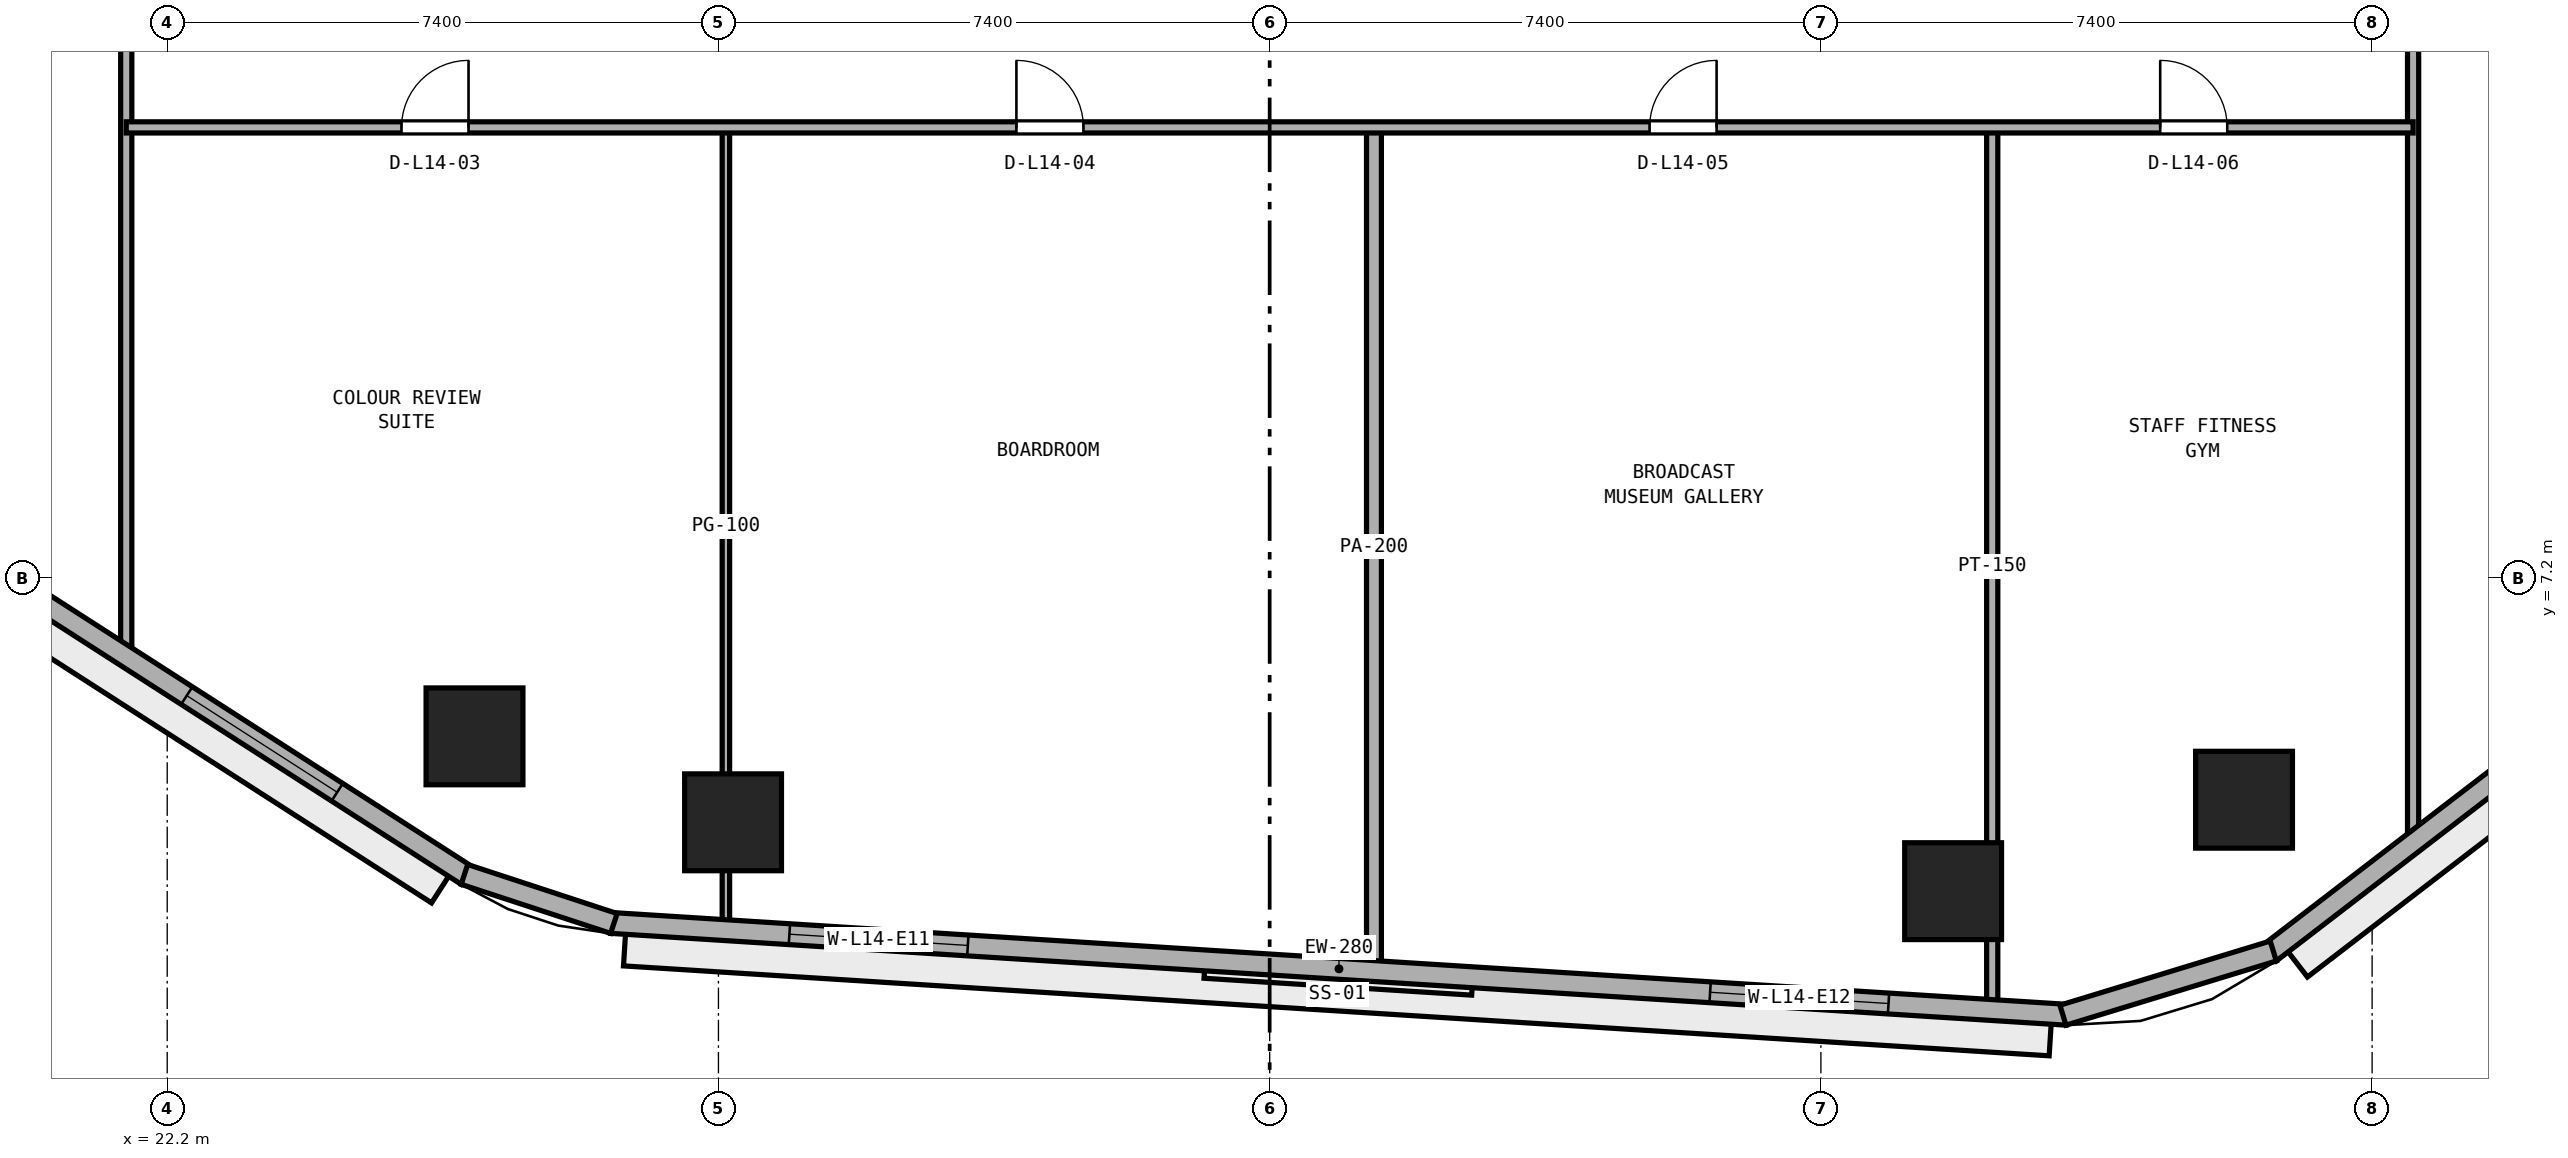
"""IFC4 building model, lengths in metres.
Left out: names, types, materials, properties, quantities, classifications, styles, units other than length and angle.
Written with IfcOpenShell. Run it as: python <this file> out.ifc"""

import sys

from ifc_helpers import new_model, si_unit, direction, frame, frame_2d, origin, origin_2d, place, context, subcontext, project, spatial, rectangle, extrude, element, fill, save


model = new_model("IFC4")
c1 = context("Model", 3, precision=1e-05, world=origin(), true_north=direction((0.0, 1.0)))
c2 = subcontext(c1, "Body", "Model", "MODEL_VIEW")
j1 = project(units=[si_unit("LENGTHUNIT", "METRE"), si_unit("PLANEANGLEUNIT", "RADIAN")], contexts=[c1])
p1 = place(None, origin())
s1 = spatial("IfcSite", under=j1, at=p1, CompositionType="ELEMENT")
p2 = place(p1, origin())
s2 = spatial("IfcBuilding", under=s1, at=p2, CompositionType="ELEMENT")
p3 = place(p2, frame((0.0, 0.0, 59.2)))
s3 = spatial("IfcBuildingStorey", under=s2, at=p3, CompositionType="ELEMENT", Elevation=59.2)
for number, where, z_axis, x_axis in (
    (1, (29.796, 3.922, 0.0), (0.0, 0.0, 1.0), (1.0, 0.0, 0.0)),
    (2, (46.175, 2.998, 0.0), (0.0, 0.0, 1.0), (1.0, 0.0, 0.0)),
    (3, (50.081, 4.225, 0.0), (0.0, 0.0, 1.0), (1.0, 0.0, 0.0)),
    (4, (26.325, 5.076, 0.0), (0.0, 0.0, 1.0), (1.0, 0.0, 0.0)),
):
    element("IfcColumn", number, at=place(p3, frame(where, z_axis=z_axis, x_axis=x_axis)), inside=s3, PredefinedType="COLUMN", context=c2, shape_type="SweptSolid", body=[
        extrude(rectangle(XDim=1.3, YDim=1.3, at=origin_2d()), origin(), (0.0, 0.0, 1.0), 3.8),
    ])
p4 = place(p3, frame((52.35, 3.611, 0.0), z_axis=(0.0, 0.0, 1.0), x_axis=(0.0, 1.0, 0.0)))
e5 = element("IfcWall", 5, at=p4, inside=s3, PredefinedType="PARTITIONING", context=c2, shape_type="SweptSolid", body=[
    extrude(rectangle(XDim=43.441, YDim=0.15, at=frame_2d((21.72, 0.0))), origin(), (0.0, 0.0, 1.0), 3.525),
])
p5 = place(p4, frame((12.364, 0.0, 0.0)))
e6 = element("IfcOpeningElement", 6, at=p5, cuts=e5, PredefinedType="OPENING", context=c2, shape_type="SweptSolid", body=[
    extrude(rectangle(XDim=0.9, YDim=2.1, at=frame_2d((0.45, 1.05))), frame((0.0, 0.085, 0.0), z_axis=(0.0, -1.0, 0.0), x_axis=(1.0, 0.0, 0.0)), (0.0, 0.0, 1.0), 0.17),
])
p6 = place(p4, frame((18.889, 0.0, 0.0)))
e7 = element("IfcOpeningElement", 7, at=p6, cuts=e5, PredefinedType="OPENING", context=c2, shape_type="SweptSolid", body=[
    extrude(rectangle(XDim=1.0, YDim=2.12, at=frame_2d((0.5, 1.06))), frame((0.0, 0.085, 0.0), z_axis=(0.0, -1.0, 0.0), x_axis=(1.0, 0.0, 0.0)), (0.0, 0.0, 1.0), 0.17),
])
p7 = place(p4, frame((25.689, 0.0, 0.0)))
e8 = element("IfcOpeningElement", 8, at=p7, cuts=e5, PredefinedType="OPENING", context=c2, shape_type="SweptSolid", body=[
    extrude(rectangle(XDim=1.0, YDim=2.12, at=frame_2d((0.5, 1.06))), frame((0.0, 0.085, 0.0), z_axis=(0.0, -1.0, 0.0), x_axis=(1.0, 0.0, 0.0)), (0.0, 0.0, 1.0), 0.17),
])
p8 = place(p4, frame((31.114, 0.0, 0.0)))
e9 = element("IfcOpeningElement", 9, at=p8, cuts=e5, PredefinedType="OPENING", context=c2, shape_type="SweptSolid", body=[
    extrude(rectangle(XDim=0.9, YDim=2.1, at=frame_2d((0.45, 1.05))), frame((0.0, 0.085, 0.0), z_axis=(0.0, -1.0, 0.0), x_axis=(1.0, 0.0, 0.0)), (0.0, 0.0, 1.0), 0.17),
])
p9 = place(p3, frame((46.7, 1.467, 0.0), z_axis=(0.0, 0.0, 1.0), x_axis=(0.0, 1.0, 0.0)))
e10 = element("IfcWall", 10, at=p9, inside=s3, PredefinedType="PARTITIONING", context=c2, shape_type="SweptSolid", body=[
    extrude(rectangle(XDim=11.783, YDim=0.15, at=frame_2d((5.892, 0.0))), origin(), (0.0, 0.0, 1.0), 3.525),
])
p10 = place(p3, frame((38.4, 1.99, 0.0), z_axis=(0.0, 0.0, 1.0), x_axis=(0.0, 1.0, 0.0)))
e11 = element("IfcWall", 11, at=p10, inside=s3, PredefinedType="PARTITIONING", context=c2, shape_type="SweptSolid", body=[
    extrude(rectangle(XDim=11.26, YDim=0.2, at=frame_2d((5.63, 0.0))), origin(), (0.0, 0.0, 1.0), 3.525),
])
p11 = place(p3, frame((29.7, 2.539, 0.0), z_axis=(0.0, 0.0, 1.0), x_axis=(0.0, 1.0, 0.0)))
e12 = element("IfcWall", 12, at=p11, inside=s3, PredefinedType="PARTITIONING", context=c2, shape_type="SweptSolid", body=[
    extrude(rectangle(XDim=10.711, YDim=0.1, at=frame_2d((5.355, 0.0))), origin(), (0.0, 0.0, 1.0), 2.908),
])
p12 = place(p3, frame((21.65, 6.119, 0.0), z_axis=(0.0, 0.0, 1.0), x_axis=(0.0, 1.0, 0.0)))
e13 = element("IfcWall", 13, at=p12, inside=s3, PredefinedType="PARTITIONING", context=c2, shape_type="SweptSolid", body=[
    extrude(rectangle(XDim=37.884, YDim=0.15, at=frame_2d((18.942, 0.0))), origin(), (0.0, 0.0, 1.0), 3.525),
])
p13 = place(p12, frame((13.556, 0.0, 0.0)))
e14 = element("IfcOpeningElement", 14, at=p13, cuts=e13, PredefinedType="OPENING", context=c2, shape_type="SweptSolid", body=[
    extrude(rectangle(XDim=0.9, YDim=2.1, at=frame_2d((0.45, 1.05))), frame((0.0, 0.085, 0.0), z_axis=(0.0, -1.0, 0.0), x_axis=(1.0, 0.0, 0.0)), (0.0, 0.0, 1.0), 0.17),
])
p14 = place(p12, frame((25.506, 0.0, 0.0)))
e15 = element("IfcOpeningElement", 15, at=p14, cuts=e13, PredefinedType="OPENING", context=c2, shape_type="SweptSolid", body=[
    extrude(rectangle(XDim=0.9, YDim=2.1, at=frame_2d((0.45, 1.05))), frame((0.0, 0.085, 0.0), z_axis=(0.0, -1.0, 0.0), x_axis=(1.0, 0.0, 0.0)), (0.0, 0.0, 1.0), 0.17),
])
p15 = place(p3, frame((21.65, 13.25, 0.0), z_axis=(0.0, 0.0, 1.0), x_axis=(1.0, 0.0, 0.0)))
e16 = element("IfcWall", 16, at=p15, inside=s3, PredefinedType="PARTITIONING", context=c2, shape_type="SweptSolid", body=[
    extrude(rectangle(XDim=30.7, YDim=0.15, at=frame_2d((15.35, 0.0))), origin(), (0.0, 0.0, 1.0), 3.525),
])
p16 = place(p15, frame((3.695, 0.0, 0.0)))
e17 = element("IfcOpeningElement", 17, at=p16, cuts=e16, PredefinedType="OPENING", context=c2, shape_type="SweptSolid", body=[
    extrude(rectangle(XDim=0.9, YDim=2.1, at=frame_2d((0.45, 1.05))), frame((0.0, 0.085, 0.0), z_axis=(0.0, -1.0, 0.0), x_axis=(1.0, 0.0, 0.0)), (0.0, 0.0, 1.0), 0.17),
])
p17 = place(p15, frame((11.95, 0.0, 0.0)))
e18 = element("IfcOpeningElement", 18, at=p17, cuts=e16, PredefinedType="OPENING", context=c2, shape_type="SweptSolid", body=[
    extrude(rectangle(XDim=0.9, YDim=2.1, at=frame_2d((0.45, 1.05))), frame((0.0, 0.085, 0.0), z_axis=(0.0, -1.0, 0.0), x_axis=(1.0, 0.0, 0.0)), (0.0, 0.0, 1.0), 0.17),
])
p18 = place(p15, frame((20.45, 0.0, 0.0)))
e19 = element("IfcOpeningElement", 19, at=p18, cuts=e16, PredefinedType="OPENING", context=c2, shape_type="SweptSolid", body=[
    extrude(rectangle(XDim=0.9, YDim=2.1, at=frame_2d((0.45, 1.05))), frame((0.0, 0.085, 0.0), z_axis=(0.0, -1.0, 0.0), x_axis=(1.0, 0.0, 0.0)), (0.0, 0.0, 1.0), 0.17),
])
p19 = place(p15, frame((27.305, 0.0, 0.0)))
e20 = element("IfcOpeningElement", 20, at=p19, cuts=e16, PredefinedType="OPENING", context=c2, shape_type="SweptSolid", body=[
    extrude(rectangle(XDim=0.9, YDim=2.1, at=frame_2d((0.45, 1.05))), frame((0.0, 0.085, 0.0), z_axis=(0.0, -1.0, 0.0), x_axis=(1.0, 0.0, 0.0)), (0.0, 0.0, 1.0), 0.17),
])
p20 = place(p3, frame((28.161, 2.571, 0.0), z_axis=(0.0, 0.0, 1.0), x_axis=(0.998017288298, -0.06294038654, 0.0)))
e21 = element("IfcWall", 21, at=p20, inside=s3, PredefinedType="STANDARD", context=c2, shape_type="SweptSolid", body=[
    extrude(rectangle(XDim=19.577, YDim=0.28, at=frame_2d((9.789, 0.0))), origin(), (0.0, 0.0, 1.0), 3.525),
])
p21 = place(p20, frame((2.396, 0.0, 0.9)))
e22 = element("IfcOpeningElement", 22, at=p21, cuts=e21, PredefinedType="OPENING", context=c2, shape_type="SweptSolid", body=[
    extrude(rectangle(XDim=2.4, YDim=1.75, at=frame_2d((1.2, 0.875))), frame((0.0, 0.15, 0.0), z_axis=(0.0, -1.0, 0.0), x_axis=(1.0, 0.0, 0.0)), (0.0, 0.0, 1.0), 0.3),
])
p22 = place(p20, frame((14.781, 0.0, 0.9)))
e23 = element("IfcOpeningElement", 23, at=p22, cuts=e21, PredefinedType="OPENING", context=c2, shape_type="SweptSolid", body=[
    extrude(rectangle(XDim=2.4, YDim=1.75, at=frame_2d((1.2, 0.875))), frame((0.0, 0.15, 0.0), z_axis=(0.0, -1.0, 0.0), x_axis=(1.0, 0.0, 0.0)), (0.0, 0.0, 1.0), 0.3),
])
p23 = place(p3, frame((50.429, 2.172, 0.0), z_axis=(0.0, 0.0, 1.0), x_axis=(0.792937466367, 0.609303023488, 0.0)))
e24 = element("IfcWall", 24, at=p23, inside=s3, PredefinedType="STANDARD", context=c2, shape_type="SweptSolid", body=[
    extrude(rectangle(XDim=17.713, YDim=0.28, at=frame_2d((8.856, 0.0))), origin(), (0.0, 0.0, 1.0), 3.525),
])
p24 = place(p23, frame((7.656, 0.0, 0.9)))
e25 = element("IfcOpeningElement", 25, at=p24, cuts=e24, PredefinedType="OPENING", context=c2, shape_type="SweptSolid", body=[
    extrude(rectangle(XDim=2.4, YDim=1.75, at=frame_2d((1.2, 0.875))), frame((0.0, 0.15, 0.0), z_axis=(0.0, -1.0, 0.0), x_axis=(1.0, 0.0, 0.0)), (0.0, 0.0, 1.0), 0.3),
])
p25 = place(p23, frame((13.227, 0.0, 0.9)))
e26 = element("IfcOpeningElement", 26, at=p25, cuts=e24, PredefinedType="OPENING", context=c2, shape_type="SweptSolid", body=[
    extrude(rectangle(XDim=2.4, YDim=1.75, at=frame_2d((1.2, 0.875))), frame((0.0, 0.15, 0.0), z_axis=(0.0, -1.0, 0.0), x_axis=(1.0, 0.0, 0.0)), (0.0, 0.0, 1.0), 0.3),
])
p26 = place(p3, frame((11.405, 12.728, 0.0), z_axis=(0.0, 0.0, 1.0), x_axis=(0.841304564637, -0.540561402175, 0.0)))
e27 = element("IfcWall", 27, at=p26, inside=s3, PredefinedType="STANDARD", context=c2, shape_type="SweptSolid", body=[
    extrude(rectangle(XDim=17.612, YDim=0.28, at=frame_2d((8.806, 0.0))), origin(), (0.0, 0.0, 1.0), 3.525),
])
p27 = place(p26, frame((2.069, 0.0, 0.9)))
e28 = element("IfcOpeningElement", 28, at=p27, cuts=e27, PredefinedType="OPENING", context=c2, shape_type="SweptSolid", body=[
    extrude(rectangle(XDim=2.4, YDim=1.75, at=frame_2d((1.2, 0.875))), frame((0.0, 0.15, 0.0), z_axis=(0.0, -1.0, 0.0), x_axis=(1.0, 0.0, 0.0)), (0.0, 0.0, 1.0), 0.3),
])
p28 = place(p26, frame((7.606, 0.0, 0.9)))
e29 = element("IfcOpeningElement", 29, at=p28, cuts=e27, PredefinedType="OPENING", context=c2, shape_type="SweptSolid", body=[
    extrude(rectangle(XDim=2.4, YDim=1.75, at=frame_2d((1.2, 0.875))), frame((0.0, 0.15, 0.0), z_axis=(0.0, -1.0, 0.0), x_axis=(1.0, 0.0, 0.0)), (0.0, 0.0, 1.0), 0.3),
])
p29 = place(p26, frame((13.143, 0.0, 0.9)))
e30 = element("IfcOpeningElement", 30, at=p29, cuts=e27, PredefinedType="OPENING", context=c2, shape_type="SweptSolid", body=[
    extrude(rectangle(XDim=2.4, YDim=1.75, at=frame_2d((1.2, 0.875))), frame((0.0, 0.15, 0.0), z_axis=(0.0, -1.0, 0.0), x_axis=(1.0, 0.0, 0.0)), (0.0, 0.0, 1.0), 0.3),
])
p30 = place(p3, frame((47.65, 1.333, 0.0), z_axis=(0.0, 0.0, 1.0), x_axis=(0.956461287977, 0.291859220516, 0.0)))
e31 = element("IfcWall", 31, at=p30, inside=s3, PredefinedType="STANDARD", context=c2, shape_type="SweptSolid", body=[
    extrude(rectangle(XDim=2.952, YDim=0.28, at=frame_2d((1.476, 0.0))), origin(), (0.0, 0.0, 1.0), 3.525),
])
p31 = place(p3, frame((26.19, 3.223, 0.0), z_axis=(0.0, 0.0, 1.0), x_axis=(0.95016442175, -0.311749212734, 0.0)))
e32 = element("IfcWall", 32, at=p31, inside=s3, PredefinedType="STANDARD", context=c2, shape_type="SweptSolid", body=[
    extrude(rectangle(XDim=2.111, YDim=0.28, at=frame_2d((1.056, 0.0))), origin(), (0.0, 0.0, 1.0), 3.525),
])
p32 = place(p16, origin())
e33 = element("IfcDoor", 33, at=p32, inside=s3, OperationType="SINGLE_SWING_RIGHT", PredefinedType="DOOR", context=c2, shape_type="SweptSolid", body=[
    extrude(rectangle(XDim=0.9, YDim=2.1, at=frame_2d((0.45, 1.05))), frame((0.0, 0.025, 0.0), z_axis=(0.0, -1.0, 0.0), x_axis=(1.0, 0.0, 0.0)), (0.0, 0.0, 1.0), 0.05),
])
fill(e17, e33)
p33 = place(p17, origin())
e34 = element("IfcDoor", 34, at=p33, inside=s3, OperationType="SINGLE_SWING_LEFT", PredefinedType="DOOR", context=c2, shape_type="SweptSolid", body=[
    extrude(rectangle(XDim=0.9, YDim=2.1, at=frame_2d((0.45, 1.05))), frame((0.0, 0.025, 0.0), z_axis=(0.0, -1.0, 0.0), x_axis=(1.0, 0.0, 0.0)), (0.0, 0.0, 1.0), 0.05),
])
fill(e18, e34)
p34 = place(p18, origin())
e35 = element("IfcDoor", 35, at=p34, inside=s3, OperationType="SINGLE_SWING_RIGHT", PredefinedType="DOOR", context=c2, shape_type="SweptSolid", body=[
    extrude(rectangle(XDim=0.9, YDim=2.1, at=frame_2d((0.45, 1.05))), frame((0.0, 0.025, 0.0), z_axis=(0.0, -1.0, 0.0), x_axis=(1.0, 0.0, 0.0)), (0.0, 0.0, 1.0), 0.05),
])
fill(e19, e35)
p35 = place(p19, origin())
e36 = element("IfcDoor", 36, at=p35, inside=s3, OperationType="SINGLE_SWING_LEFT", PredefinedType="DOOR", context=c2, shape_type="SweptSolid", body=[
    extrude(rectangle(XDim=0.9, YDim=2.1, at=frame_2d((0.45, 1.05))), frame((0.0, 0.025, 0.0), z_axis=(0.0, -1.0, 0.0), x_axis=(1.0, 0.0, 0.0)), (0.0, 0.0, 1.0), 0.05),
])
fill(e20, e36)
p36 = place(p21, origin())
e37 = element("IfcWindow", 37, at=p36, inside=s3, PartitioningType="SINGLE_PANEL", PredefinedType="WINDOW", context=c2, shape_type="SweptSolid", body=[
    extrude(rectangle(XDim=2.4, YDim=1.75, at=frame_2d((1.2, 0.875))), frame((0.0, 0.03, 0.0), z_axis=(0.0, -1.0, 0.0), x_axis=(1.0, 0.0, 0.0)), (0.0, 0.0, 1.0), 0.06),
])
fill(e22, e37)
p37 = place(p22, origin())
e38 = element("IfcWindow", 38, at=p37, inside=s3, PartitioningType="SINGLE_PANEL", PredefinedType="WINDOW", context=c2, shape_type="SweptSolid", body=[
    extrude(rectangle(XDim=2.4, YDim=1.75, at=frame_2d((1.2, 0.875))), frame((0.0, 0.03, 0.0), z_axis=(0.0, -1.0, 0.0), x_axis=(1.0, 0.0, 0.0)), (0.0, 0.0, 1.0), 0.06),
])
fill(e23, e38)
p38 = place(p29, origin())
e39 = element("IfcWindow", 39, at=p38, inside=s3, PartitioningType="SINGLE_PANEL", PredefinedType="WINDOW", context=c2, shape_type="SweptSolid", body=[
    extrude(rectangle(XDim=2.4, YDim=1.75, at=frame_2d((1.2, 0.875))), frame((0.0, 0.03, 0.0), z_axis=(0.0, -1.0, 0.0), x_axis=(1.0, 0.0, 0.0)), (0.0, 0.0, 1.0), 0.06),
])
fill(e30, e39)
save(model, sys.argv[1])
